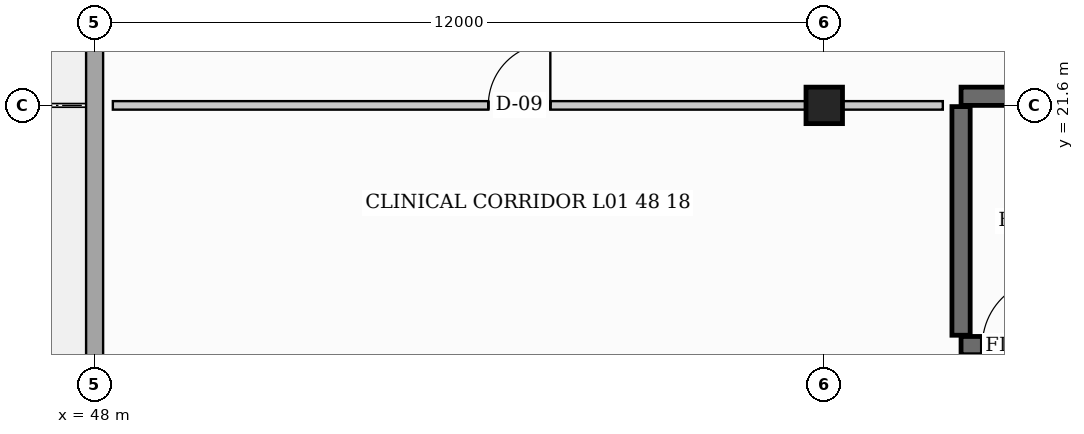
"""IFC4 building model, lengths in metres.
Left out: names, types, materials, properties, quantities, classifications, styles, units other than length and angle.
Written with IfcOpenShell. Run it as: python <this file> out.ifc"""

import sys

from ifc_helpers import new_model, si_unit, direction, frame, frame_2d, origin, origin_2d, place, context, subcontext, project, spatial, rectangle, extrude, element, fill, save


model = new_model("IFC4")
c1 = context("Model", 3, precision=1e-05, world=origin(), true_north=direction((0.0, 1.0)))
c2 = subcontext(c1, "Body", "Model", "MODEL_VIEW")
j1 = project(units=[si_unit("LENGTHUNIT", "METRE"), si_unit("PLANEANGLEUNIT", "RADIAN")], contexts=[c1])
p1 = place(None, origin())
s1 = spatial("IfcSite", under=j1, at=p1, CompositionType="ELEMENT")
p2 = place(p1, origin())
s2 = spatial("IfcBuilding", under=s1, at=p2, CompositionType="ELEMENT")
p3 = place(p2, frame((0.0, 0.0, 4.8)))
s3 = spatial("IfcBuildingStorey", under=s2, at=p3, CompositionType="ELEMENT", Elevation=4.8)
p4 = place(p3, frame((60.0, 21.6, 0.0), z_axis=(0.0, 0.0, 1.0), x_axis=(0.0, 1.0, 0.0)))
e1 = element("IfcColumn", 1, at=p4, inside=s3, PredefinedType="COLUMN", context=c2, shape_type="SweptSolid", body=[
    extrude(rectangle(XDim=0.6, YDim=0.6, at=origin_2d()), origin(), (0.0, 0.0, 1.0), 4.8),
])
p5 = place(p3, frame((62.25, 17.65, 0.0), z_axis=(0.0, 0.0, 1.0), x_axis=(1.0, 0.0, 0.0)))
e2 = element("IfcWall", 2, at=p5, inside=s3, PredefinedType="SHEAR", context=c2, shape_type="SweptSolid", body=[
    extrude(rectangle(XDim=8.7, YDim=0.3, at=frame_2d((4.35, 0.0))), origin(), (0.0, 0.0, 1.0), 4.8),
])
p6 = place(p5, frame((0.35, 0.0, 0.0)))
e3 = element("IfcOpeningElement", 3, at=p6, cuts=e2, PredefinedType="OPENING", context=c2, shape_type="SweptSolid", body=[
    extrude(rectangle(XDim=1.1, YDim=2.15, at=frame_2d((0.55, 1.075))), frame((0.0, 0.16, 0.0), z_axis=(0.0, -1.0, 0.0), x_axis=(1.0, 0.0, 0.0)), (0.0, 0.0, 1.0), 0.32),
])
p7 = place(p3, frame((70.95, 21.75, 0.0), z_axis=(0.0, 0.0, 1.0), x_axis=(-1.0, 0.0, 0.0)))
e4 = element("IfcWall", 4, at=p7, inside=s3, PredefinedType="SHEAR", context=c2, shape_type="SweptSolid", body=[
    extrude(rectangle(XDim=8.7, YDim=0.3, at=frame_2d((4.35, 0.0))), origin(), (0.0, 0.0, 1.0), 4.8),
])
p8 = place(p3, frame((62.25, 17.82, 0.0), z_axis=(0.0, 0.0, 1.0), x_axis=(0.0, 1.0, 0.0)))
e5 = element("IfcWall", 5, at=p8, inside=s3, PredefinedType="SHEAR", context=c2, shape_type="SweptSolid", body=[
    extrude(rectangle(XDim=3.76, YDim=0.3, at=frame_2d((1.88, 0.0))), origin(), (0.0, 0.0, 1.0), 4.8),
])
p9 = place(p3, frame((48.0, 0.0, 0.0), z_axis=(0.0, 0.0, 1.0), x_axis=(0.0, 1.0, 0.0)))
e6 = element("IfcWall", 6, at=p9, inside=s3, PredefinedType="STANDARD", context=c2, shape_type="SweptSolid", body=[
    extrude(rectangle(XDim=45.6, YDim=0.28, at=frame_2d((22.8, 0.0))), origin(), (0.0, 0.0, 1.0), 3.515),
])
p10 = place(p3, frame((48.3, 21.6, 0.0), z_axis=(0.0, 0.0, 1.0), x_axis=(1.0, 0.0, 0.0)))
e7 = element("IfcWall", 7, at=p10, inside=s3, PredefinedType="PARTITIONING", context=c2, shape_type="SweptSolid", body=[
    extrude(rectangle(XDim=13.65, YDim=0.14, at=frame_2d((6.825, 0.0))), origin(), (0.0, 0.0, 1.0), 3.48),
])
p11 = place(p10, frame((6.175, 0.0, 0.0)))
e8 = element("IfcOpeningElement", 8, at=p11, cuts=e7, PredefinedType="OPENING", context=c2, shape_type="SweptSolid", body=[
    extrude(rectangle(XDim=1.02, YDim=2.08, at=frame_2d((0.51, 1.04))), frame((0.0, 0.08, 0.0), z_axis=(0.0, -1.0, 0.0), x_axis=(1.0, 0.0, 0.0)), (0.0, 0.0, 1.0), 0.16),
])
p12 = place(p6, origin())
e9 = element("IfcDoor", 9, at=p12, inside=s3, OperationType="SINGLE_SWING_RIGHT", PredefinedType="DOOR", context=c2, shape_type="SweptSolid", body=[
    extrude(rectangle(XDim=1.1, YDim=2.15, at=frame_2d((0.55, 1.075))), frame((0.0, 0.025, 0.0), z_axis=(0.0, -1.0, 0.0), x_axis=(1.0, 0.0, 0.0)), (0.0, 0.0, 1.0), 0.05),
])
fill(e3, e9)
p13 = place(p11, origin())
e10 = element("IfcDoor", 10, at=p13, inside=s3, OperationType="SINGLE_SWING_RIGHT", PredefinedType="DOOR", context=c2, shape_type="SweptSolid", body=[
    extrude(rectangle(XDim=1.02, YDim=2.08, at=frame_2d((0.51, 1.04))), frame((0.0, 0.025, 0.0), z_axis=(0.0, -1.0, 0.0), x_axis=(1.0, 0.0, 0.0)), (0.0, 0.0, 1.0), 0.05),
])
fill(e8, e10)
save(model, sys.argv[1])
